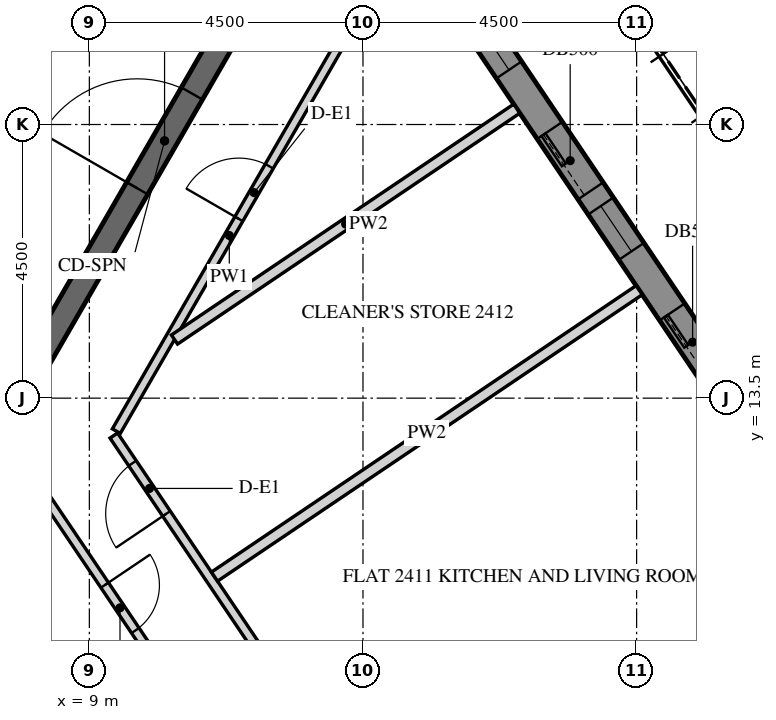
"""IFC4 building model, lengths in metres.
Left out: names, types, materials, properties, quantities, classifications, styles, units other than length and angle.
Written with IfcOpenShell. Run it as: python <this file> out.ifc"""

import sys

from ifc_helpers import new_model, si_unit, direction, frame, frame_2d, origin, place, context, subcontext, project, spatial, polyline, rectangle, outline, extrude, element, fill, save


model = new_model("IFC4")
c1 = context("Model", 3, precision=1e-05, world=origin(), true_north=direction((0.0, 1.0)))
c2 = subcontext(c1, "Body", "Model", "MODEL_VIEW")
j1 = project(units=[si_unit("LENGTHUNIT", "METRE"), si_unit("PLANEANGLEUNIT", "RADIAN")], contexts=[c1])
p1 = place(None, origin())
s1 = spatial("IfcSite", under=j1, at=p1, CompositionType="ELEMENT")
p2 = place(p1, origin())
s2 = spatial("IfcBuilding", under=s1, at=p2, CompositionType="ELEMENT")
p3 = place(p2, frame((0.0, 0.0, 303.0)))
s3 = spatial("IfcBuildingStorey", under=s2, at=p3, CompositionType="ELEMENT", Elevation=303.0)
p4 = place(p3, frame((26.706, 2.879, -0.15), z_axis=(0.0, 0.0, 1.0), x_axis=(-0.559197891507, 0.829034208061, 0.0)))
e1 = element("IfcWall", 1, at=p4, inside=s3, PredefinedType="SOLIDWALL", context=c2, shape_type="SweptSolid", body=[
    extrude(outline(polyline([(0.25, -0.25), (22.795, -0.25), (23.295, 0.25), (-0.25, 0.25), (0.25, -0.25)])), origin(), (0.0, 0.0, 1.0), 3.9),
])
p5 = place(p4, frame((1.323, 0.0, 1.05)))
e2 = element("IfcOpeningElement", 2, at=p5, cuts=e1, PredefinedType="OPENING", context=c2, shape_type="SweptSolid", body=[
    extrude(rectangle(XDim=0.9, YDim=1.5, at=frame_2d((0.45, 0.75))), frame((0.0, 0.26, 0.0), z_axis=(0.0, -1.0, 0.0), x_axis=(1.0, 0.0, 0.0)), (0.0, 0.0, 1.0), 0.52),
])
p6 = place(p4, frame((2.522, 0.0, 0.15)))
e3 = element("IfcOpeningElement", 3, at=p6, cuts=e1, PredefinedType="OPENING", context=c2, shape_type="SweptSolid", body=[
    extrude(rectangle(XDim=1.2, YDim=2.4, at=frame_2d((0.6, 1.2))), frame((0.0, 0.26, 0.0), z_axis=(0.0, -1.0, 0.0), x_axis=(1.0, 0.0, 0.0)), (0.0, 0.0, 1.0), 0.52),
])
p7 = place(p4, frame((4.922, 0.0, 1.05)))
e4 = element("IfcOpeningElement", 4, at=p7, cuts=e1, PredefinedType="OPENING", context=c2, shape_type="SweptSolid", body=[
    extrude(rectangle(XDim=0.9, YDim=1.5, at=frame_2d((0.45, 0.75))), frame((0.0, 0.26, 0.0), z_axis=(0.0, -1.0, 0.0), x_axis=(1.0, 0.0, 0.0)), (0.0, 0.0, 1.0), 0.52),
])
p8 = place(p4, frame((6.122, 0.0, 0.15)))
e5 = element("IfcOpeningElement", 5, at=p8, cuts=e1, PredefinedType="OPENING", context=c2, shape_type="SweptSolid", body=[
    extrude(rectangle(XDim=1.2, YDim=2.4, at=frame_2d((0.6, 1.2))), frame((0.0, 0.26, 0.0), z_axis=(0.0, -1.0, 0.0), x_axis=(1.0, 0.0, 0.0)), (0.0, 0.0, 1.0), 0.52),
])
p9 = place(p4, frame((8.522, 0.0, 1.05)))
e6 = element("IfcOpeningElement", 6, at=p9, cuts=e1, PredefinedType="OPENING", context=c2, shape_type="SweptSolid", body=[
    extrude(rectangle(XDim=0.9, YDim=1.5, at=frame_2d((0.45, 0.75))), frame((0.0, 0.26, 0.0), z_axis=(0.0, -1.0, 0.0), x_axis=(1.0, 0.0, 0.0)), (0.0, 0.0, 1.0), 0.52),
])
p10 = place(p4, frame((9.722, 0.0, 0.15)))
e7 = element("IfcOpeningElement", 7, at=p10, cuts=e1, PredefinedType="OPENING", context=c2, shape_type="SweptSolid", body=[
    extrude(rectangle(XDim=1.2, YDim=2.4, at=frame_2d((0.6, 1.2))), frame((0.0, 0.26, 0.0), z_axis=(0.0, -1.0, 0.0), x_axis=(1.0, 0.0, 0.0)), (0.0, 0.0, 1.0), 0.52),
])
p11 = place(p4, frame((12.122, 0.0, 1.05)))
e8 = element("IfcOpeningElement", 8, at=p11, cuts=e1, PredefinedType="OPENING", context=c2, shape_type="SweptSolid", body=[
    extrude(rectangle(XDim=0.9, YDim=1.5, at=frame_2d((0.45, 0.75))), frame((0.0, 0.26, 0.0), z_axis=(0.0, -1.0, 0.0), x_axis=(1.0, 0.0, 0.0)), (0.0, 0.0, 1.0), 0.52),
])
p12 = place(p4, frame((13.323, 0.0, 0.15)))
e9 = element("IfcOpeningElement", 9, at=p12, cuts=e1, PredefinedType="OPENING", context=c2, shape_type="SweptSolid", body=[
    extrude(rectangle(XDim=1.2, YDim=2.4, at=frame_2d((0.6, 1.2))), frame((0.0, 0.26, 0.0), z_axis=(0.0, -1.0, 0.0), x_axis=(1.0, 0.0, 0.0)), (0.0, 0.0, 1.0), 0.52),
])
p13 = place(p4, frame((15.722, 0.0, 1.05)))
e10 = element("IfcOpeningElement", 10, at=p13, cuts=e1, PredefinedType="OPENING", context=c2, shape_type="SweptSolid", body=[
    extrude(rectangle(XDim=0.9, YDim=1.5, at=frame_2d((0.45, 0.75))), frame((0.0, 0.26, 0.0), z_axis=(0.0, -1.0, 0.0), x_axis=(1.0, 0.0, 0.0)), (0.0, 0.0, 1.0), 0.52),
])
p14 = place(p4, frame((16.922, 0.0, 0.15)))
e11 = element("IfcOpeningElement", 11, at=p14, cuts=e1, PredefinedType="OPENING", context=c2, shape_type="SweptSolid", body=[
    extrude(rectangle(XDim=1.2, YDim=2.4, at=frame_2d((0.6, 1.2))), frame((0.0, 0.26, 0.0), z_axis=(0.0, -1.0, 0.0), x_axis=(1.0, 0.0, 0.0)), (0.0, 0.0, 1.0), 0.52),
])
p15 = place(p4, frame((19.323, 0.0, 1.05)))
e12 = element("IfcOpeningElement", 12, at=p15, cuts=e1, PredefinedType="OPENING", context=c2, shape_type="SweptSolid", body=[
    extrude(rectangle(XDim=0.9, YDim=1.5, at=frame_2d((0.45, 0.75))), frame((0.0, 0.26, 0.0), z_axis=(0.0, -1.0, 0.0), x_axis=(1.0, 0.0, 0.0)), (0.0, 0.0, 1.0), 0.52),
])
p16 = place(p4, frame((20.522, 0.0, 0.15)))
e13 = element("IfcOpeningElement", 13, at=p16, cuts=e1, PredefinedType="OPENING", context=c2, shape_type="SweptSolid", body=[
    extrude(rectangle(XDim=1.2, YDim=2.4, at=frame_2d((0.6, 1.2))), frame((0.0, 0.26, 0.0), z_axis=(0.0, -1.0, 0.0), x_axis=(1.0, 0.0, 0.0)), (0.0, 0.0, 1.0), 0.52),
])
p17 = place(p3, frame((12.471, 0.0, -0.15), z_axis=(0.0, 0.0, 1.0), x_axis=(-0.499996419489, 0.866027470984, 0.0)))
e14 = element("IfcWall", 14, at=p17, inside=s3, PredefinedType="SHEAR", context=c2, shape_type="SweptSolid", body=[
    extrude(outline(polyline([(-0.115, -0.2), (12.586, -0.2), (12.355, 0.2), (0.115, 0.2), (-0.115, -0.2)])), origin(), (0.0, 0.0, 1.0), 3.9),
])
p18 = place(p17, frame((5.306, 0.0, 0.15)))
e15 = element("IfcOpeningElement", 15, at=p18, cuts=e14, PredefinedType="OPENING", context=c2, shape_type="SweptSolid", body=[
    extrude(rectangle(XDim=1.8, YDim=2.4, at=frame_2d((0.9, 1.2))), frame((0.0, 0.21, 0.0), z_axis=(0.0, -1.0, 0.0), x_axis=(1.0, 0.0, 0.0)), (0.0, 0.0, 1.0), 0.42),
])
p19 = place(p3, frame((6.351, 11.0, -0.15), z_axis=(0.0, 0.0, 1.0), x_axis=(0.499998894578, 0.866026041999, 0.0)))
e16 = element("IfcWall", 16, at=p19, inside=s3, PredefinedType="SHEAR", context=c2, shape_type="SweptSolid", body=[
    extrude(rectangle(XDim=15.544, YDim=0.4, at=frame_2d((7.772, 0.0))), origin(), (0.0, 0.0, 1.0), 3.9),
])
p20 = place(p19, frame((6.872, 0.0, 0.15)))
e17 = element("IfcOpeningElement", 17, at=p20, cuts=e16, PredefinedType="OPENING", context=c2, shape_type="SweptSolid", body=[
    extrude(rectangle(XDim=1.8, YDim=2.4, at=frame_2d((0.9, 1.2))), frame((0.0, 0.21, 0.0), z_axis=(0.0, -1.0, 0.0), x_axis=(1.0, 0.0, 0.0)), (0.0, 0.0, 1.0), 0.42),
])
p21 = place(p3, frame((18.875, -1.158, 0.0), z_axis=(0.0, 0.0, 1.0), x_axis=(-0.55919880344, 0.829033592945, 0.0)))
e18 = element("IfcWall", 18, at=p21, inside=s3, PredefinedType="PARTITIONING", context=c2, shape_type="SweptSolid", body=[
    extrude(rectangle(XDim=16.939, YDim=0.15, at=frame_2d((8.47, 0.0))), origin(), (0.0, 0.0, 1.0), 2.988),
])
p22 = place(p21, frame((4.09, 0.0, 0.0)))
e19 = element("IfcOpeningElement", 19, at=p22, cuts=e18, PredefinedType="OPENING", context=c2, shape_type="SweptSolid", body=[
    extrude(rectangle(XDim=1.0, YDim=2.1, at=frame_2d((0.5, 1.05))), frame((0.0, 0.085, 0.0), z_axis=(0.0, -1.0, 0.0), x_axis=(1.0, 0.0, 0.0)), (0.0, 0.0, 1.0), 0.17),
])
p23 = place(p21, frame((15.39, 0.0, 0.0)))
e20 = element("IfcOpeningElement", 20, at=p23, cuts=e18, PredefinedType="OPENING", context=c2, shape_type="SweptSolid", body=[
    extrude(rectangle(XDim=1.0, YDim=2.1, at=frame_2d((0.5, 1.05))), frame((0.0, 0.085, 0.0), z_axis=(0.0, -1.0, 0.0), x_axis=(1.0, 0.0, 0.0)), (0.0, 0.0, 1.0), 0.17),
])
p24 = place(p3, frame((9.444, 12.957, 0.0), z_axis=(0.0, 0.0, 1.0), x_axis=(0.500004967958, 0.866022535513, 0.0)))
e21 = element("IfcWall", 21, at=p24, inside=s3, PredefinedType="PARTITIONING", context=c2, shape_type="SweptSolid", body=[
    extrude(rectangle(XDim=7.431, YDim=0.15, at=frame_2d((3.715, 0.0))), origin(), (0.0, 0.0, 1.0), 2.988),
])
p25 = place(p24, frame((4.03, 0.0, 0.0)))
e22 = element("IfcOpeningElement", 22, at=p25, cuts=e21, PredefinedType="OPENING", context=c2, shape_type="SweptSolid", body=[
    extrude(rectangle(XDim=1.0, YDim=2.1, at=frame_2d((0.5, 1.05))), frame((0.0, 0.085, 0.0), z_axis=(0.0, -1.0, 0.0), x_axis=(1.0, 0.0, 0.0)), (0.0, 0.0, 1.0), 0.17),
])
p26 = place(p3, frame((7.861, 12.488, 0.0), z_axis=(0.0, 0.0, 1.0), x_axis=(0.559178186788, -0.829047498893, 0.0)))
e23 = element("IfcWall", 23, at=p26, inside=s3, PredefinedType="PARTITIONING", context=c2, shape_type="SweptSolid", body=[
    extrude(rectangle(XDim=5.878, YDim=0.15, at=frame_2d((2.939, 0.0))), origin(), (0.0, 0.0, 1.0), 2.988),
])
p27 = place(p26, frame((2.489, 0.0, 0.0)))
e24 = element("IfcOpeningElement", 24, at=p27, cuts=e23, PredefinedType="OPENING", context=c2, shape_type="SweptSolid", body=[
    extrude(rectangle(XDim=0.9, YDim=2.1, at=frame_2d((0.45, 1.05))), frame((0.0, 0.085, 0.0), z_axis=(0.0, -1.0, 0.0), x_axis=(1.0, 0.0, 0.0)), (0.0, 0.0, 1.0), 0.17),
])
p28 = place(p3, frame((18.042, 15.276, 0.0), z_axis=(0.0, 0.0, 1.0), x_axis=(-0.829037762759, -0.559192621481, 0.0)))
e25 = element("IfcWall", 25, at=p28, inside=s3, PredefinedType="PARTITIONING", context=c2, shape_type="SweptSolid", body=[
    extrude(rectangle(XDim=8.425, YDim=0.18, at=frame_2d((4.212, 0.0))), origin(), (0.0, 0.0, 1.0), 2.988),
])
p29 = place(p3, frame((16.029, 18.26, 0.0), z_axis=(0.0, 0.0, 1.0), x_axis=(-0.82904538001, -0.559181328268, 0.0)))
e26 = element("IfcWall", 26, at=p29, inside=s3, PredefinedType="PARTITIONING", context=c2, shape_type="SweptSolid", body=[
    extrude(rectangle(XDim=6.79, YDim=0.18, at=frame_2d((3.395, 0.0))), origin(), (0.0, 0.0, 1.0), 2.988),
])
p30 = place(p12, frame((0.0, 0.175, 0.0)))
e27 = element("IfcDoor", 27, at=p30, inside=s3, OperationType="SLIDING_TO_LEFT", PredefinedType="DOOR", context=c2, shape_type="SweptSolid", body=[
    extrude(rectangle(XDim=1.2, YDim=2.4, at=frame_2d((0.6, 1.2))), frame((0.0, 0.025, 0.0), z_axis=(0.0, -1.0, 0.0), x_axis=(1.0, 0.0, 0.0)), (0.0, 0.0, 1.0), 0.05),
])
fill(e9, e27)
p31 = place(p13, frame((0.0, 0.18, 0.0)))
e28 = element("IfcWindow", 28, at=p31, inside=s3, PartitioningType="SINGLE_PANEL", PredefinedType="WINDOW", context=c2, shape_type="SweptSolid", body=[
    extrude(rectangle(XDim=0.9, YDim=1.5, at=frame_2d((0.45, 0.75))), frame((0.0, 0.03, 0.0), z_axis=(0.0, -1.0, 0.0), x_axis=(1.0, 0.0, 0.0)), (0.0, 0.0, 1.0), 0.06),
])
fill(e10, e28)
p32 = place(p14, frame((0.0, 0.175, 0.0)))
e29 = element("IfcDoor", 29, at=p32, inside=s3, OperationType="SLIDING_TO_LEFT", PredefinedType="DOOR", context=c2, shape_type="SweptSolid", body=[
    extrude(rectangle(XDim=1.2, YDim=2.4, at=frame_2d((0.6, 1.2))), frame((0.0, 0.025, 0.0), z_axis=(0.0, -1.0, 0.0), x_axis=(1.0, 0.0, 0.0)), (0.0, 0.0, 1.0), 0.05),
])
fill(e11, e29)
p33 = place(p15, frame((0.0, 0.18, 0.0)))
e30 = element("IfcWindow", 30, at=p33, inside=s3, PartitioningType="SINGLE_PANEL", PredefinedType="WINDOW", context=c2, shape_type="SweptSolid", body=[
    extrude(rectangle(XDim=0.9, YDim=1.5, at=frame_2d((0.45, 0.75))), frame((0.0, 0.03, 0.0), z_axis=(0.0, -1.0, 0.0), x_axis=(1.0, 0.0, 0.0)), (0.0, 0.0, 1.0), 0.06),
])
fill(e12, e30)
p34 = place(p20, origin())
e31 = element("IfcDoor", 31, at=p34, inside=s3, OperationType="DOUBLE_DOOR_SINGLE_SWING", PredefinedType="DOOR", context=c2, shape_type="SweptSolid", body=[
    extrude(rectangle(XDim=1.8, YDim=2.4, at=frame_2d((0.9, 1.2))), frame((0.0, 0.025, 0.0), z_axis=(0.0, -1.0, 0.0), x_axis=(1.0, 0.0, 0.0)), (0.0, 0.0, 1.0), 0.05),
])
fill(e17, e31)
p35 = place(p23, origin())
e32 = element("IfcDoor", 32, at=p35, inside=s3, OperationType="SINGLE_SWING_LEFT", PredefinedType="DOOR", context=c2, shape_type="SweptSolid", body=[
    extrude(rectangle(XDim=1.0, YDim=2.1, at=frame_2d((0.5, 1.05))), frame((0.0, 0.025, 0.0), z_axis=(0.0, -1.0, 0.0), x_axis=(1.0, 0.0, 0.0)), (0.0, 0.0, 1.0), 0.05),
])
fill(e20, e32)
p36 = place(p25, origin())
e33 = element("IfcDoor", 33, at=p36, inside=s3, OperationType="SINGLE_SWING_RIGHT", PredefinedType="DOOR", context=c2, shape_type="SweptSolid", body=[
    extrude(rectangle(XDim=1.0, YDim=2.1, at=frame_2d((0.5, 1.05))), frame((0.0, 0.025, 0.0), z_axis=(0.0, -1.0, 0.0), x_axis=(1.0, 0.0, 0.0)), (0.0, 0.0, 1.0), 0.05),
])
fill(e22, e33)
p37 = place(p27, origin())
e34 = element("IfcDoor", 34, at=p37, inside=s3, OperationType="SINGLE_SWING_RIGHT", PredefinedType="DOOR", context=c2, shape_type="SweptSolid", body=[
    extrude(rectangle(XDim=0.9, YDim=2.1, at=frame_2d((0.45, 1.05))), frame((0.0, 0.025, 0.0), z_axis=(0.0, -1.0, 0.0), x_axis=(1.0, 0.0, 0.0)), (0.0, 0.0, 1.0), 0.05),
])
fill(e24, e34)
save(model, sys.argv[1])
